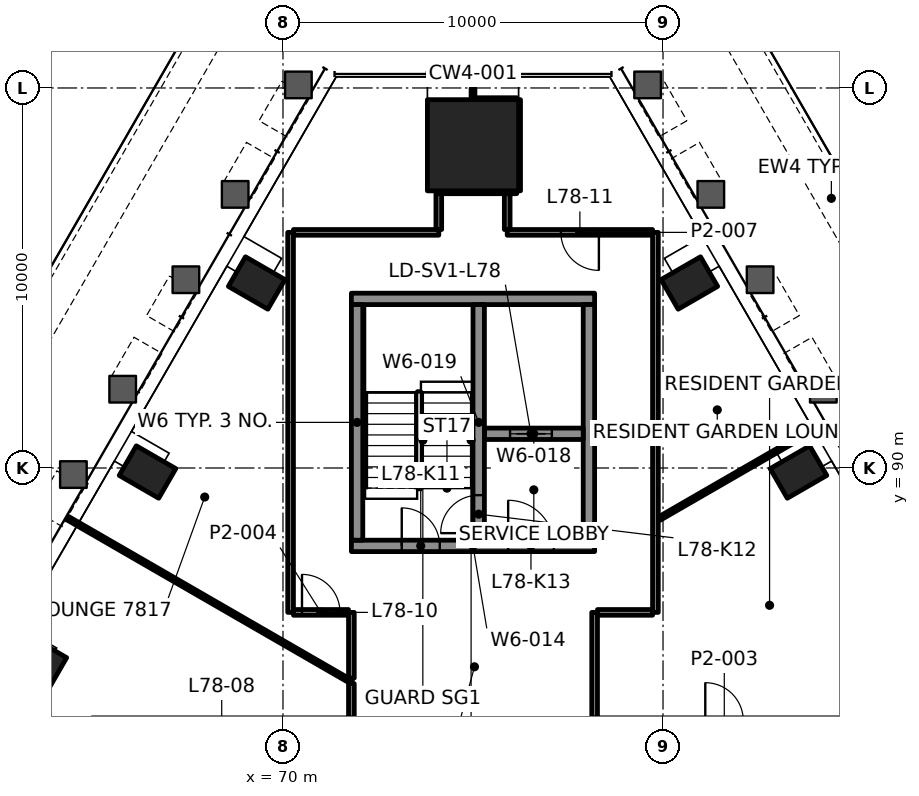
"""IFC4 building model, lengths in metres.
Left out: names, types, materials, properties, quantities, classifications, styles, units other than length and angle.
Written with IfcOpenShell. Run it as: python <this file> out.ifc"""

import sys

from ifc_helpers import new_model, si_unit, direction, frame, frame_2d, origin, origin_2d, place, context, subcontext, project, spatial, rectangle, hollow_rectangle, extrude, element, fill, save


model = new_model("IFC4")
c1 = context("Model", 3, precision=1e-05, world=origin(), true_north=direction((0.0, 1.0)))
c2 = subcontext(c1, "Body", "Model", "MODEL_VIEW")
j1 = project(units=[si_unit("LENGTHUNIT", "METRE"), si_unit("PLANEANGLEUNIT", "RADIAN")], contexts=[c1])
p1 = place(None, origin())
s1 = spatial("IfcSite", under=j1, at=p1, CompositionType="ELEMENT")
p2 = place(p1, origin())
s2 = spatial("IfcBuilding", under=s1, at=p2, CompositionType="ELEMENT")
p3 = place(p2, frame((0.0, 0.0, 319.6)))
s3 = spatial("IfcBuildingStorey", under=s2, at=p3, CompositionType="ELEMENT", Elevation=319.6)
p4 = place(p3, frame((75.0, 98.493, 0.0), z_axis=(0.0, 0.0, 1.0), x_axis=(-1.0, 0.0, 0.0)))
e1 = element("IfcColumn", 1, at=p4, inside=s3, PredefinedType="COLUMN", context=c2, shape_type="SweptSolid", body=[
    extrude(rectangle(XDim=2.4, YDim=2.4, at=origin_2d()), origin(), (0.0, 0.0, 1.0), 3.5),
])
for number, where, z_axis, x_axis in (
    (2, (83.565, 89.894, -0.0), (0.0, 0.0, 1.0), (-0.5, 0.866, 0.0)),
    (3, (80.693, 94.868, -0.0), (0.0, 0.0, 1.0), (-0.5, 0.866, 0.0)),
    (4, (69.307, 94.868, -0.0), (0.0, 0.0, 1.0), (-0.5, -0.866, 0.0)),
    (5, (66.435, 89.894, -0.0), (0.0, 0.0, 1.0), (-0.5, -0.866, 0.0)),
    (6, (63.563, 84.919, -0.0), (0.0, 0.0, 1.0), (-0.5, -0.866, 0.0)),
):
    element("IfcColumn", number, at=place(p3, frame(where, z_axis=z_axis, x_axis=x_axis)), inside=s3, PredefinedType="COLUMN", context=c2, shape_type="SweptSolid", body=[
        extrude(hollow_rectangle(XDim=0.9, YDim=1.2, WallThickness=0.06, at=origin_2d()), origin(), (0.0, 0.0, 1.0), 3.5),
    ])
p5 = place(p3, frame((71.8, 87.95, 0.0), z_axis=(0.0, 0.0, 1.0), x_axis=(1.0, 0.0, 0.0)))
e7 = element("IfcWall", 7, at=p5, inside=s3, PredefinedType="SHEAR", context=c2, shape_type="SweptSolid", body=[
    extrude(rectangle(XDim=6.4, YDim=0.3, at=frame_2d((3.2, 0.0))), origin(), (0.0, 0.0, 1.0), 3.3),
])
p6 = place(p5, frame((1.325, 0.0, 0.0)))
e8 = element("IfcOpeningElement", 8, at=p6, cuts=e7, PredefinedType="OPENING", context=c2, shape_type="SweptSolid", body=[
    extrude(rectangle(XDim=1.0, YDim=2.1, at=frame_2d((0.5, 1.05))), frame((0.0, 0.16, 0.0), z_axis=(0.0, -1.0, 0.0), x_axis=(1.0, 0.0, 0.0)), (0.0, 0.0, 1.0), 0.32),
])
p7 = place(p5, frame((4.125, 0.0, 0.0)))
e9 = element("IfcOpeningElement", 9, at=p7, cuts=e7, PredefinedType="OPENING", context=c2, shape_type="SweptSolid", body=[
    extrude(rectangle(XDim=1.2, YDim=2.1, at=frame_2d((0.6, 1.05))), frame((0.0, 0.16, 0.0), z_axis=(0.0, -1.0, 0.0), x_axis=(1.0, 0.0, 0.0)), (0.0, 0.0, 1.0), 0.32),
])
p8 = place(p3, frame((71.8, 94.45, 0.0), z_axis=(0.0, 0.0, 1.0), x_axis=(1.0, 0.0, 0.0)))
e10 = element("IfcWall", 10, at=p8, inside=s3, PredefinedType="SHEAR", context=c2, shape_type="SweptSolid", body=[
    extrude(rectangle(XDim=6.4, YDim=0.3, at=frame_2d((3.2, 0.0))), origin(), (0.0, 0.0, 1.0), 3.3),
])
for number, where, z_axis, x_axis in (
    (11, (71.95, 88.1, 0.0), (0.0, 0.0, 1.0), (0.0, 1.0, 0.0)),
    (12, (78.05, 88.1, 0.0), (0.0, 0.0, 1.0), (0.0, 1.0, 0.0)),
):
    element("IfcWall", number, at=place(p3, frame(where, z_axis=z_axis, x_axis=x_axis)), inside=s3, PredefinedType="SHEAR", context=c2, shape_type="SweptSolid", body=[
        extrude(rectangle(XDim=6.2, YDim=0.3, at=frame_2d((3.1, 0.0))), origin(), (0.0, 0.0, 1.0), 3.3),
    ])
p9 = place(p3, frame((75.3, 90.9, 0.0), z_axis=(0.0, 0.0, 1.0), x_axis=(1.0, 0.0, 0.0)))
e13 = element("IfcWall", 13, at=p9, inside=s3, PredefinedType="SHEAR", context=c2, shape_type="SweptSolid", body=[
    extrude(rectangle(XDim=2.6, YDim=0.3, at=frame_2d((1.3, 0.0))), origin(), (0.0, 0.0, 1.0), 3.3),
])
p10 = place(p9, frame((0.675, 0.0, 0.0)))
e14 = element("IfcOpeningElement", 14, at=p10, cuts=e13, PredefinedType="OPENING", context=c2, shape_type="SweptSolid", body=[
    extrude(rectangle(XDim=1.1, YDim=2.1, at=frame_2d((0.55, 1.05))), frame((0.0, 0.16, 0.0), z_axis=(0.0, -1.0, 0.0), x_axis=(1.0, 0.0, 0.0)), (0.0, 0.0, 1.0), 0.32),
])
p11 = place(p3, frame((75.15, 88.1, 0.0), z_axis=(0.0, 0.0, 1.0), x_axis=(0.0, 1.0, 0.0)))
e15 = element("IfcWall", 15, at=p11, inside=s3, PredefinedType="SHEAR", context=c2, shape_type="SweptSolid", body=[
    extrude(rectangle(XDim=6.2, YDim=0.3, at=frame_2d((3.1, 0.0))), origin(), (0.0, 0.0, 1.0), 3.3),
])
p12 = place(p11, frame((0.185, 0.0, 0.0)))
e16 = element("IfcOpeningElement", 16, at=p12, cuts=e15, PredefinedType="OPENING", context=c2, shape_type="SweptSolid", body=[
    extrude(rectangle(XDim=1.0, YDim=2.1, at=frame_2d((0.5, 1.05))), frame((0.0, 0.16, 0.0), z_axis=(0.0, -1.0, 0.0), x_axis=(1.0, 0.0, 0.0)), (0.0, 0.0, 1.0), 0.32),
])
p13 = place(p3, frame((70.276, 86.2, 0.0), z_axis=(0.0, 0.0, 1.0), x_axis=(1.0, 0.0, 0.0)))
e17 = element("IfcWall", 17, at=p13, inside=s3, PredefinedType="PARTITIONING", context=c2, shape_type="SweptSolid", body=[
    extrude(rectangle(XDim=1.449, YDim=0.15, at=frame_2d((0.725, 0.0))), origin(), (0.0, 0.0, 1.0), 2.7),
])
p14 = place(p13, frame((0.225, 0.0, 0.0)))
e18 = element("IfcOpeningElement", 18, at=p14, cuts=e17, PredefinedType="OPENING", context=c2, shape_type="SweptSolid", body=[
    extrude(rectangle(XDim=1.0, YDim=2.1, at=frame_2d((0.5, 1.05))), frame((0.0, 0.085, 0.0), z_axis=(0.0, -1.0, 0.0), x_axis=(1.0, 0.0, 0.0)), (0.0, 0.0, 1.0), 0.17),
])
p15 = place(p3, frame((78.275, 86.2, 0.0), z_axis=(0.0, 0.0, 1.0), x_axis=(1.0, 0.0, 0.0)))
e19 = element("IfcWall", 19, at=p15, inside=s3, PredefinedType="PARTITIONING", context=c2, shape_type="SweptSolid", body=[
    extrude(rectangle(XDim=1.449, YDim=0.15, at=frame_2d((0.725, 0.0))), origin(), (0.0, 0.0, 1.0), 2.7),
])
p16 = place(p3, frame((70.276, 96.2, 0.0), z_axis=(0.0, 0.0, 1.0), x_axis=(1.0, 0.0, 0.0)))
e20 = element("IfcWall", 20, at=p16, inside=s3, PredefinedType="PARTITIONING", context=c2, shape_type="SweptSolid", body=[
    extrude(rectangle(XDim=3.824, YDim=0.15, at=frame_2d((1.912, 0.0))), origin(), (0.0, 0.0, 1.0), 2.7),
])
p17 = place(p3, frame((79.725, 96.2, 0.0), z_axis=(0.0, 0.0, 1.0), x_axis=(-1.0, 0.0, 0.0)))
e21 = element("IfcWall", 21, at=p17, inside=s3, PredefinedType="PARTITIONING", context=c2, shape_type="SweptSolid", body=[
    extrude(rectangle(XDim=3.825, YDim=0.15, at=frame_2d((1.912, 0.0))), origin(), (0.0, 0.0, 1.0), 2.7),
])
p18 = place(p17, frame((1.412, 0.0, 0.0)))
e22 = element("IfcOpeningElement", 22, at=p18, cuts=e21, PredefinedType="OPENING", context=c2, shape_type="SweptSolid", body=[
    extrude(rectangle(XDim=1.0, YDim=2.1, at=frame_2d((0.5, 1.05))), frame((0.0, 0.085, 0.0), z_axis=(0.0, -1.0, 0.0), x_axis=(1.0, 0.0, 0.0)), (0.0, 0.0, 1.0), 0.17),
])
p19 = place(p3, frame((74.101, 97.293, 0.0), z_axis=(0.0, 0.0, 1.0), x_axis=(1.0, 0.0, 0.0)))
e23 = element("IfcWall", 23, at=p19, inside=s3, PredefinedType="PARTITIONING", context=c2, shape_type="SweptSolid", body=[
    extrude(rectangle(XDim=2.049, YDim=0.15, at=frame_2d((1.024, 0.0))), origin(), (0.0, 0.0, 1.0), 2.697),
])
p20 = place(p3, frame((75.0, 99.693, 0.0), z_axis=(0.0, 0.0, 1.0), x_axis=(1.0, 0.0, 0.0)))
e24 = element("IfcWall", 24, at=p20, inside=s3, PredefinedType="PARTITIONING", context=c2, shape_type="SweptSolid", body=[
    extrude(rectangle(XDim=1.149, YDim=0.1, at=frame_2d((0.574, 0.0))), origin(), (0.0, 0.0, 1.0), 2.7),
])
p21 = place(p3, frame((79.901, 88.668, 0.0), z_axis=(0.0, 0.0, 1.0), x_axis=(0.866025588148, 0.499999680672, 0.0)))
e25 = element("IfcWall", 25, at=p21, inside=s3, PredefinedType="PARTITIONING", context=c2, shape_type="SweptSolid", body=[
    extrude(rectangle(XDim=5.006, YDim=0.1, at=frame_2d((2.503, 0.0))), origin(), (0.0, 0.0, 1.0), 2.7),
])
p22 = place(p3, frame((79.8, 86.2, 0.0), z_axis=(0.0, 0.0, 1.0), x_axis=(0.0, 1.0, 0.0)))
e26 = element("IfcWall", 26, at=p22, inside=s3, PredefinedType="PARTITIONING", context=c2, shape_type="SweptSolid", body=[
    extrude(rectangle(XDim=9.999, YDim=0.15, at=frame_2d((5.0, 0.0))), origin(), (0.0, 0.0, 1.0), 2.7),
])
p23 = place(p3, frame((78.2, 83.425, 0.0), z_axis=(0.0, 0.0, 1.0), x_axis=(0.0, 1.0, 0.0)))
e27 = element("IfcWall", 27, at=p23, inside=s3, PredefinedType="PARTITIONING", context=c2, shape_type="SweptSolid", body=[
    extrude(rectangle(XDim=2.775, YDim=0.15, at=frame_2d((1.387, 0.0))), origin(), (0.0, 0.0, 1.0), 2.7),
])
p24 = place(p3, frame((76.2, 97.293, 0.0), z_axis=(0.0, 0.0, 1.0), x_axis=(0.0, 1.0, 0.0)))
e28 = element("IfcWall", 28, at=p24, inside=s3, PredefinedType="PARTITIONING", context=c2, shape_type="SweptSolid", body=[
    extrude(rectangle(XDim=2.399, YDim=0.1, at=frame_2d((1.2, 0.0))), origin(), (0.0, 0.0, 1.0), 2.7),
])
p25 = place(p3, frame((75.9, 96.275, 0.0), z_axis=(0.0, 0.0, 1.0), x_axis=(0.0, 1.0, 0.0)))
e29 = element("IfcWall", 29, at=p25, inside=s3, PredefinedType="PARTITIONING", context=c2, shape_type="SweptSolid", body=[
    extrude(rectangle(XDim=0.943, YDim=0.15, at=frame_2d((0.471, 0.0))), origin(), (0.0, 0.0, 1.0), 2.7),
])
p26 = place(p3, frame((75.0, 99.743, 0.0), z_axis=(0.0, 0.0, 1.0), x_axis=(0.0, 1.0, 0.0)))
e30 = element("IfcWall", 30, at=p26, inside=s3, PredefinedType="PARTITIONING", context=c2, shape_type="SweptSolid", body=[
    extrude(rectangle(XDim=0.249, YDim=0.1, at=frame_2d((0.125, 0.0))), origin(), (0.0, 0.0, 1.0), 2.7),
])
p27 = place(p3, frame((74.1, 96.275, 0.0), z_axis=(0.0, 0.0, 1.0), x_axis=(0.0, 1.0, 0.0)))
e31 = element("IfcWall", 31, at=p27, inside=s3, PredefinedType="PARTITIONING", context=c2, shape_type="SweptSolid", body=[
    extrude(rectangle(XDim=0.942, YDim=0.15, at=frame_2d((0.471, 0.0))), origin(), (0.0, 0.0, 1.0), 2.7),
])
p28 = place(p3, frame((71.8, 83.425, 0.0), z_axis=(0.0, 0.0, 1.0), x_axis=(0.0, 1.0, 0.0)))
e32 = element("IfcWall", 32, at=p28, inside=s3, PredefinedType="PARTITIONING", context=c2, shape_type="SweptSolid", body=[
    extrude(rectangle(XDim=0.901, YDim=0.15, at=frame_2d((0.451, 0.0))), origin(), (0.0, 0.0, 1.0), 2.7),
])
p29 = place(p3, frame((70.2, 86.2, 0.0), z_axis=(0.0, 0.0, 1.0), x_axis=(0.0, 1.0, 0.0)))
e33 = element("IfcWall", 33, at=p29, inside=s3, PredefinedType="PARTITIONING", context=c2, shape_type="SweptSolid", body=[
    extrude(rectangle(XDim=9.999, YDim=0.15, at=frame_2d((5.0, 0.0))), origin(), (0.0, 0.0, 1.0), 2.7),
])
p30 = place(p3, frame((71.8, 84.369, 0.0), z_axis=(0.0, 0.0, 1.0), x_axis=(-0.866030088378, 0.499991885958, 0.0)))
e34 = element("IfcWall", 34, at=p30, inside=s3, PredefinedType="PARTITIONING", context=c2, shape_type="SweptSolid", body=[
    extrude(rectangle(XDim=8.628, YDim=0.1, at=frame_2d((4.314, 0.0))), origin(), (0.0, 0.0, 1.0), 2.688),
])
p31 = place(p3, frame((71.8, 84.47, 0.0), z_axis=(0.0, 0.0, 1.0), x_axis=(0.0, 1.0, 0.0)))
e35 = element("IfcWall", 35, at=p31, inside=s3, PredefinedType="PARTITIONING", context=c2, shape_type="SweptSolid", body=[
    extrude(rectangle(XDim=1.729, YDim=0.15, at=frame_2d((0.865, 0.0))), origin(), (0.0, 0.0, 1.0), 2.7),
])
p32 = place(p3, frame((87.976, 90.953, 0.0), z_axis=(0.0, 0.0, 1.0), x_axis=(-0.499998569178, 0.866026229868, 0.0)))
e36 = element("IfcWall", 36, at=p32, inside=s3, PredefinedType="SOLIDWALL", context=c2, shape_type="SweptSolid", body=[
    extrude(rectangle(XDim=14.185, YDim=0.8, at=frame_2d((7.093, 0.0))), origin(), (0.0, 0.0, 1.0), 0.9),
])
p33 = place(p3, frame((69.117, 103.238, 0.0), z_axis=(0.0, 0.0, 1.0), x_axis=(-0.500002433271, -0.86602399893, 0.0)))
e37 = element("IfcWall", 37, at=p33, inside=s3, PredefinedType="SOLIDWALL", context=c2, shape_type="SweptSolid", body=[
    extrude(rectangle(XDim=29.715, YDim=0.8, at=frame_2d((14.857, 0.0))), origin(), (0.0, 0.0, 1.0), 0.9),
])
p34 = place(p14, origin())
e38 = element("IfcDoor", 38, at=p34, inside=s3, OperationType="SINGLE_SWING_RIGHT", PredefinedType="DOOR", context=c2, shape_type="SweptSolid", body=[
    extrude(rectangle(XDim=1.0, YDim=2.1, at=frame_2d((0.5, 1.05))), frame((0.0, 0.025, 0.0), z_axis=(0.0, -1.0, 0.0), x_axis=(1.0, 0.0, 0.0)), (0.0, 0.0, 1.0), 0.05),
])
fill(e18, e38)
p35 = place(p18, origin())
e39 = element("IfcDoor", 39, at=p35, inside=s3, OperationType="SINGLE_SWING_RIGHT", PredefinedType="DOOR", context=c2, shape_type="SweptSolid", body=[
    extrude(rectangle(XDim=1.0, YDim=2.1, at=frame_2d((0.5, 1.05))), frame((0.0, 0.025, 0.0), z_axis=(0.0, -1.0, 0.0), x_axis=(1.0, 0.0, 0.0)), (0.0, 0.0, 1.0), 0.05),
])
fill(e22, e39)
p36 = place(p10, origin())
e40 = element("IfcDoor", 40, at=p36, inside=s3, OperationType="DOUBLE_DOOR_SLIDING", PredefinedType="DOOR", context=c2, shape_type="SweptSolid", body=[
    extrude(rectangle(XDim=1.1, YDim=2.1, at=frame_2d((0.55, 1.05))), frame((0.0, 0.025, 0.0), z_axis=(0.0, -1.0, 0.0), x_axis=(1.0, 0.0, 0.0)), (0.0, 0.0, 1.0), 0.05),
])
fill(e14, e40)
p37 = place(p6, origin())
e41 = element("IfcDoor", 41, at=p37, inside=s3, OperationType="SINGLE_SWING_RIGHT", PredefinedType="DOOR", context=c2, shape_type="SweptSolid", body=[
    extrude(rectangle(XDim=1.0, YDim=2.1, at=frame_2d((0.5, 1.05))), frame((0.0, 0.025, 0.0), z_axis=(0.0, -1.0, 0.0), x_axis=(1.0, 0.0, 0.0)), (0.0, 0.0, 1.0), 0.05),
])
fill(e8, e41)
p38 = place(p12, origin())
e42 = element("IfcDoor", 42, at=p38, inside=s3, OperationType="SINGLE_SWING_LEFT", PredefinedType="DOOR", context=c2, shape_type="SweptSolid", body=[
    extrude(rectangle(XDim=1.0, YDim=2.1, at=frame_2d((0.5, 1.05))), frame((0.0, 0.025, 0.0), z_axis=(0.0, -1.0, 0.0), x_axis=(1.0, 0.0, 0.0)), (0.0, 0.0, 1.0), 0.05),
])
fill(e16, e42)
p39 = place(p7, origin())
e43 = element("IfcDoor", 43, at=p39, inside=s3, OperationType="SINGLE_SWING_RIGHT", PredefinedType="DOOR", context=c2, shape_type="SweptSolid", body=[
    extrude(rectangle(XDim=1.2, YDim=2.1, at=frame_2d((0.6, 1.05))), frame((0.0, 0.025, 0.0), z_axis=(0.0, -1.0, 0.0), x_axis=(1.0, 0.0, 0.0)), (0.0, 0.0, 1.0), 0.05),
])
fill(e9, e43)
save(model, sys.argv[1])
